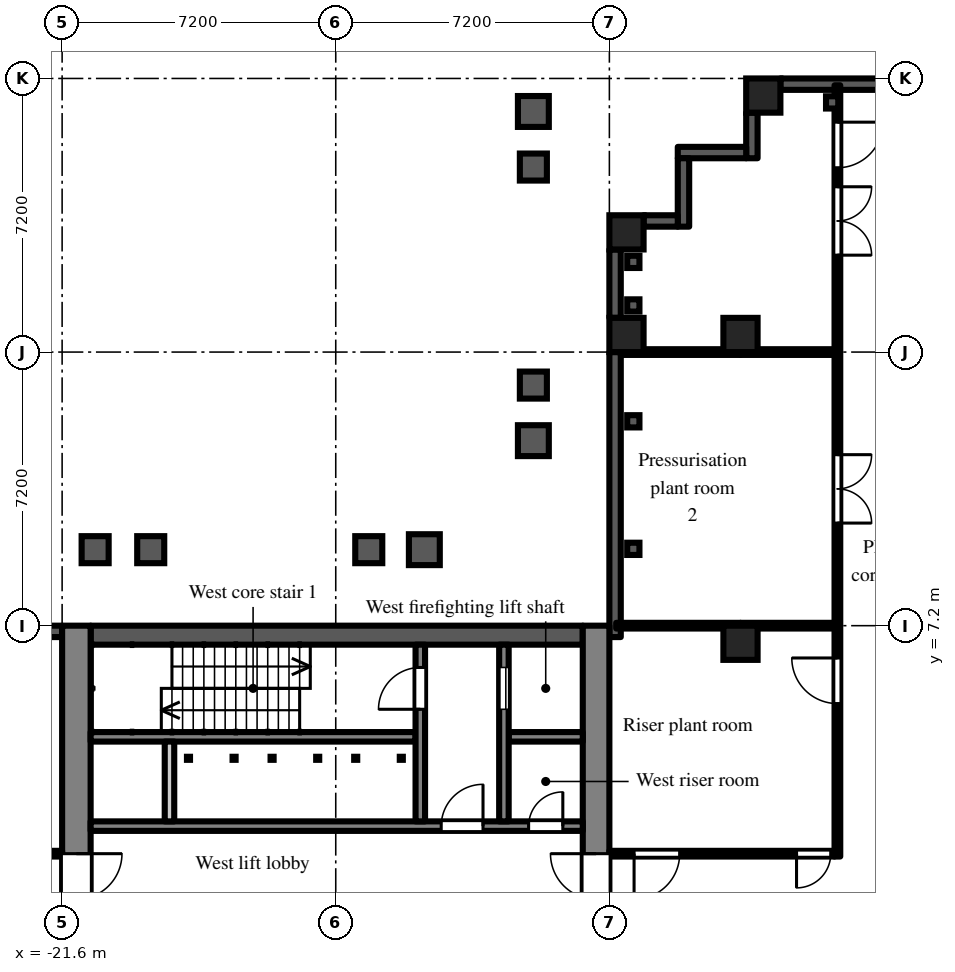
"""IFC4 building model, lengths in metres.
Left out: names, types, materials, properties, quantities, classifications, styles, units other than length and angle.
Written with IfcOpenShell. Run it as: python <this file> out.ifc"""

import sys

from ifc_helpers import new_model, si_unit, direction, frame, frame_2d, origin, origin_2d, place, context, subcontext, project, spatial, rectangle, extrude, element, fill, save


model = new_model("IFC4")
c1 = context("Model", 3, precision=1e-05, world=origin(), true_north=direction((0.0, 1.0)))
c2 = subcontext(c1, "Body", "Model", "MODEL_VIEW")
j1 = project(units=[si_unit("LENGTHUNIT", "METRE"), si_unit("PLANEANGLEUNIT", "RADIAN")], contexts=[c1])
p1 = place(None, origin())
s1 = spatial("IfcSite", under=j1, at=p1, CompositionType="ELEMENT")
p2 = place(p1, origin())
s2 = spatial("IfcBuilding", under=s1, at=p2, CompositionType="ELEMENT")
p3 = place(p2, frame((0.0, 0.0, 111.9)))
s3 = spatial("IfcBuildingStorey", under=s2, at=p3, CompositionType="ELEMENT", Elevation=111.9)
for number, where, z_axis, x_axis in (
    (1, (-6.75, 14.85, 0.0), (0.0, 0.0, 1.0), (1.0, 0.0, 0.0)),
    (2, (-6.75, 17.55, 0.0), (0.0, 0.0, 1.0), (1.0, 0.0, 0.0)),
    (3, (-3.75, 6.75, 0.0), (0.0, 0.0, 1.0), (1.0, 0.0, 0.0)),
    (4, (-3.75, 14.85, 0.0), (0.0, 0.0, 1.0), (1.0, 0.0, 0.0)),
    (5, (-3.15, 21.15, 0.0), (0.0, 0.0, 1.0), (1.0, 0.0, 0.0)),
):
    element("IfcColumn", number, at=place(p3, frame(where, z_axis=z_axis, x_axis=x_axis)), inside=s3, PredefinedType="COLUMN", context=c2, shape_type="SweptSolid", body=[
        extrude(rectangle(XDim=0.9, YDim=0.9, at=origin_2d()), origin(), (0.0, 0.0, 1.0), 4.2),
    ])
p4 = place(p3, frame((2.7, 21.45, 0.0), z_axis=(0.0, 0.0, 1.0), x_axis=(-1.0, 0.0, 0.0)))
e6 = element("IfcWall", 6, at=p4, inside=s3, PredefinedType="SOLIDWALL", context=c2, shape_type="SweptSolid", body=[
    extrude(rectangle(XDim=5.4, YDim=0.3, at=frame_2d((2.7, 0.0))), origin(), (0.0, 0.0, 1.0), 3.4),
])
p5 = place(p3, frame((-3.45, 20.7, 0.0), z_axis=(0.0, 0.0, 1.0), x_axis=(0.0, -1.0, 0.0)))
e7 = element("IfcWall", 7, at=p5, inside=s3, PredefinedType="SOLIDWALL", context=c2, shape_type="SweptSolid", body=[
    extrude(rectangle(XDim=1.2, YDim=0.3, at=frame_2d((0.6, 0.0))), origin(), (0.0, 0.0, 1.0), 3.8),
])
p6 = place(p3, frame((-3.6, 19.65, 0.0), z_axis=(0.0, 0.0, 1.0), x_axis=(-1.0, 0.0, 0.0)))
e8 = element("IfcWall", 8, at=p6, inside=s3, PredefinedType="SOLIDWALL", context=c2, shape_type="SweptSolid", body=[
    extrude(rectangle(XDim=1.8, YDim=0.3, at=frame_2d((0.9, 0.0))), origin(), (0.0, 0.0, 1.0), 3.8),
])
p7 = place(p3, frame((-5.25, 19.5, 0.0), z_axis=(0.0, 0.0, 1.0), x_axis=(0.0, -1.0, 0.0)))
e9 = element("IfcWall", 9, at=p7, inside=s3, PredefinedType="SOLIDWALL", context=c2, shape_type="SweptSolid", body=[
    extrude(rectangle(XDim=1.8, YDim=0.3, at=frame_2d((0.9, 0.0))), origin(), (0.0, 0.0, 1.0), 3.8),
])
p8 = place(p3, frame((-5.4, 17.85, 0.0), z_axis=(0.0, 0.0, 1.0), x_axis=(-1.0, 0.0, 0.0)))
e10 = element("IfcWall", 10, at=p8, inside=s3, PredefinedType="SOLIDWALL", context=c2, shape_type="SweptSolid", body=[
    extrude(rectangle(XDim=0.9, YDim=0.3, at=frame_2d((0.45, 0.0))), origin(), (0.0, 0.0, 1.0), 3.8),
])
p9 = place(p3, frame((-7.05, 17.1, 0.0), z_axis=(0.0, 0.0, 1.0), x_axis=(0.0, -1.0, 0.0)))
e11 = element("IfcWall", 11, at=p9, inside=s3, PredefinedType="SOLIDWALL", context=c2, shape_type="SweptSolid", body=[
    extrude(rectangle(XDim=1.8, YDim=0.3, at=frame_2d((0.9, 0.0))), origin(), (0.0, 0.0, 1.0), 3.4),
])
p10 = place(p3, frame((-7.05, 14.4, 0.0), z_axis=(0.0, 0.0, 1.0), x_axis=(0.0, -1.0, 0.0)))
e12 = element("IfcWall", 12, at=p10, inside=s3, PredefinedType="SOLIDWALL", context=c2, shape_type="SweptSolid", body=[
    extrude(rectangle(XDim=7.5, YDim=0.3, at=frame_2d((3.75, 0.0))), origin(), (0.0, 0.0, 1.0), 3.8),
])
p11 = place(p3, frame((-21.6, 7.05, 0.0), z_axis=(0.0, 0.0, 1.0), x_axis=(-1.0, 0.0, 0.0)))
e13 = element("IfcWall", 13, at=p11, inside=s3, PredefinedType="SOLIDWALL", context=c2, shape_type="SweptSolid", body=[
    extrude(rectangle(XDim=2.7, YDim=0.3, at=frame_2d((1.35, 0.0))), origin(), (0.0, 0.0, 1.0), 3.4),
])
p12 = place(p3, frame((-7.55, -7.2, 0.0), z_axis=(0.0, 0.0, 1.0), x_axis=(0.0, 1.0, 0.0)))
e14 = element("IfcWall", 14, at=p12, inside=s3, PredefinedType="SHEAR", context=c2, shape_type="SweptSolid", body=[
    extrude(rectangle(XDim=14.4, YDim=0.7, at=frame_2d((7.2, 0.0))), origin(), (0.0, 0.0, 1.0), 3.8),
])
p13 = place(p12, frame((6.0, 0.0, 0.0)))
e15 = element("IfcOpeningElement", 15, at=p13, cuts=e14, PredefinedType="OPENING", context=c2, shape_type="SweptSolid", body=[
    extrude(rectangle(XDim=2.4, YDim=2.2, at=frame_2d((1.2, 1.1))), frame((0.0, 0.36, 0.0), z_axis=(0.0, -1.0, 0.0), x_axis=(1.0, 0.0, 0.0)), (0.0, 0.0, 1.0), 0.72),
])
p14 = place(p3, frame((-21.225, -7.2, 0.0), z_axis=(0.0, 0.0, 1.0), x_axis=(0.0, 1.0, 0.0)))
e16 = element("IfcWall", 16, at=p14, inside=s3, PredefinedType="SHEAR", context=c2, shape_type="SweptSolid", body=[
    extrude(rectangle(XDim=14.4, YDim=0.75, at=frame_2d((7.2, 0.0))), origin(), (0.0, 0.0, 1.0), 3.8),
])
p15 = place(p14, frame((6.0, 0.0, 0.0)))
e17 = element("IfcOpeningElement", 17, at=p15, cuts=e16, PredefinedType="OPENING", context=c2, shape_type="SweptSolid", body=[
    extrude(rectangle(XDim=2.4, YDim=2.2, at=frame_2d((1.2, 1.1))), frame((0.0, 0.385, 0.0), z_axis=(0.0, -1.0, 0.0), x_axis=(1.0, 0.0, 0.0)), (0.0, 0.0, 1.0), 0.77),
])
p16 = place(p3, frame((-7.9, 6.95, 0.0), z_axis=(0.0, 0.0, 1.0), x_axis=(-1.0, 0.0, 0.0)))
e18 = element("IfcWall", 18, at=p16, inside=s3, PredefinedType="SHEAR", context=c2, shape_type="SweptSolid", body=[
    extrude(rectangle(XDim=12.95, YDim=0.5, at=frame_2d((6.475, 0.0))), origin(), (0.0, 0.0, 1.0), 3.8),
])
p17 = place(p3, frame((-7.9, 1.925, 0.0), z_axis=(0.0, 0.0, 1.0), x_axis=(-1.0, 0.0, 0.0)))
e19 = element("IfcWall", 19, at=p17, inside=s3, PredefinedType="SHEAR", context=c2, shape_type="SweptSolid", body=[
    extrude(rectangle(XDim=12.95, YDim=0.25, at=frame_2d((6.475, 0.0))), origin(), (0.0, 0.0, 1.0), 3.8),
])
p18 = place(p17, frame((0.525, 0.0, 0.0)))
e20 = element("IfcOpeningElement", 20, at=p18, cuts=e19, PredefinedType="OPENING", context=c2, shape_type="SweptSolid", body=[
    extrude(rectangle(XDim=0.9, YDim=2.1, at=frame_2d((0.45, 1.05))), frame((0.0, 0.135, 0.0), z_axis=(0.0, -1.0, 0.0), x_axis=(1.0, 0.0, 0.0)), (0.0, 0.0, 1.0), 0.27),
])
p19 = place(p17, frame((2.625, 0.0, 0.0)))
e21 = element("IfcOpeningElement", 21, at=p19, cuts=e19, PredefinedType="OPENING", context=c2, shape_type="SweptSolid", body=[
    extrude(rectangle(XDim=1.1, YDim=2.1, at=frame_2d((0.55, 1.05))), frame((0.0, 0.135, 0.0), z_axis=(0.0, -1.0, 0.0), x_axis=(1.0, 0.0, 0.0)), (0.0, 0.0, 1.0), 0.27),
])
p20 = place(p3, frame((-7.9, 4.275, 0.0), z_axis=(0.0, 0.0, 1.0), x_axis=(-1.0, 0.0, 0.0)))
e22 = element("IfcWall", 22, at=p20, inside=s3, PredefinedType="SHEAR", context=c2, shape_type="SweptSolid", body=[
    extrude(rectangle(XDim=1.95, YDim=0.25, at=frame_2d((0.975, 0.0))), origin(), (0.0, 0.0, 1.0), 3.8),
])
p21 = place(p3, frame((-12.3, 4.275, 0.0), z_axis=(0.0, 0.0, 1.0), x_axis=(-1.0, 0.0, 0.0)))
e23 = element("IfcWall", 23, at=p21, inside=s3, PredefinedType="SHEAR", context=c2, shape_type="SweptSolid", body=[
    extrude(rectangle(XDim=8.55, YDim=0.25, at=frame_2d((4.275, 0.0))), origin(), (0.0, 0.0, 1.0), 3.8),
])
p22 = place(p3, frame((-9.975, 2.05, 0.0), z_axis=(0.0, 0.0, 1.0), x_axis=(0.0, 1.0, 0.0)))
e24 = element("IfcWall", 24, at=p22, inside=s3, PredefinedType="SHEAR", context=c2, shape_type="SweptSolid", body=[
    extrude(rectangle(XDim=4.65, YDim=0.25, at=frame_2d((2.325, 0.0))), origin(), (0.0, 0.0, 1.0), 3.8),
])
p23 = place(p22, frame((2.95, 0.0, 0.0)))
e25 = element("IfcOpeningElement", 25, at=p23, cuts=e24, PredefinedType="OPENING", context=c2, shape_type="SweptSolid", body=[
    extrude(rectangle(XDim=1.1, YDim=2.1, at=frame_2d((0.55, 1.05))), frame((0.0, 0.135, 0.0), z_axis=(0.0, -1.0, 0.0), x_axis=(1.0, 0.0, 0.0)), (0.0, 0.0, 1.0), 0.27),
])
p24 = place(p3, frame((-12.175, 2.05, 0.0), z_axis=(0.0, 0.0, 1.0), x_axis=(0.0, 1.0, 0.0)))
e26 = element("IfcWall", 26, at=p24, inside=s3, PredefinedType="SHEAR", context=c2, shape_type="SweptSolid", body=[
    extrude(rectangle(XDim=4.65, YDim=0.25, at=frame_2d((2.325, 0.0))), origin(), (0.0, 0.0, 1.0), 3.8),
])
p25 = place(p24, frame((2.95, 0.0, 0.0)))
e27 = element("IfcOpeningElement", 27, at=p25, cuts=e26, PredefinedType="OPENING", context=c2, shape_type="SweptSolid", body=[
    extrude(rectangle(XDim=1.1, YDim=2.1, at=frame_2d((0.55, 1.05))), frame((0.0, 0.135, 0.0), z_axis=(0.0, -1.0, 0.0), x_axis=(1.0, 0.0, 0.0)), (0.0, 0.0, 1.0), 0.27),
])
p26 = place(p3, frame((-18.775, 2.05, 0.0), z_axis=(0.0, 0.0, 1.0), x_axis=(0.0, 1.0, 0.0)))
e28 = element("IfcWall", 28, at=p26, inside=s3, PredefinedType="PARTITIONING", context=c2, shape_type="SweptSolid", body=[
    extrude(rectangle(XDim=2.1, YDim=0.25, at=frame_2d((1.05, 0.0))), origin(), (0.0, 0.0, 1.0), 3.8),
])
p27 = place(p3, frame((-36.5, 1.2, 0.0), z_axis=(0.0, 0.0, 1.0), x_axis=(1.0, 0.0, 0.0)))
e29 = element("IfcWall", 29, at=p27, inside=s3, PredefinedType="PARTITIONING", context=c2, shape_type="SweptSolid", body=[
    extrude(rectangle(XDim=14.9, YDim=0.15, at=frame_2d((7.45, 0.0))), origin(), (0.0, 0.0, 1.0), 3.8),
])
p28 = place(p27, frame((4.75, 0.0, 0.0)))
e30 = element("IfcOpeningElement", 30, at=p28, cuts=e29, PredefinedType="OPENING", context=c2, shape_type="SweptSolid", body=[
    extrude(rectangle(XDim=0.9, YDim=2.1, at=frame_2d((0.45, 1.05))), frame((0.0, 0.085, 0.0), z_axis=(0.0, -1.0, 0.0), x_axis=(1.0, 0.0, 0.0)), (0.0, 0.0, 1.0), 0.17),
])
p29 = place(p27, frame((12.5, 0.0, 0.0)))
e31 = element("IfcOpeningElement", 31, at=p29, cuts=e29, PredefinedType="OPENING", context=c2, shape_type="SweptSolid", body=[
    extrude(rectangle(XDim=1.2, YDim=2.1, at=frame_2d((0.6, 1.05))), frame((0.0, 0.085, 0.0), z_axis=(0.0, -1.0, 0.0), x_axis=(1.0, 0.0, 0.0)), (0.0, 0.0, 1.0), 0.17),
])
p30 = place(p27, frame((1.15, 0.0, 0.0)))
e32 = element("IfcOpeningElement", 32, at=p30, cuts=e29, PredefinedType="OPENING", context=c2, shape_type="SweptSolid", body=[
    extrude(rectangle(XDim=1.8, YDim=2.1, at=frame_2d((0.9, 1.05))), frame((0.0, 0.085, 0.0), z_axis=(0.0, -1.0, 0.0), x_axis=(1.0, 0.0, 0.0)), (0.0, 0.0, 1.0), 0.17),
])
p31 = place(p3, frame((-7.2, 1.2, 0.0), z_axis=(0.0, 0.0, 1.0), x_axis=(1.0, 0.0, 0.0)))
e33 = element("IfcWall", 33, at=p31, inside=s3, PredefinedType="PARTITIONING", context=c2, shape_type="SweptSolid", body=[
    extrude(rectangle(XDim=5.925, YDim=0.15, at=frame_2d((2.962, 0.0))), origin(), (0.0, 0.0, 1.0), 3.8),
])
p32 = place(p31, frame((0.65, 0.0, 0.0)))
e34 = element("IfcOpeningElement", 34, at=p32, cuts=e33, PredefinedType="OPENING", context=c2, shape_type="SweptSolid", body=[
    extrude(rectangle(XDim=1.2, YDim=2.1, at=frame_2d((0.6, 1.05))), frame((0.0, 0.085, 0.0), z_axis=(0.0, -1.0, 0.0), x_axis=(1.0, 0.0, 0.0)), (0.0, 0.0, 1.0), 0.17),
])
p33 = place(p31, frame((4.925, 0.0, 0.0)))
e35 = element("IfcOpeningElement", 35, at=p33, cuts=e33, PredefinedType="OPENING", context=c2, shape_type="SweptSolid", body=[
    extrude(rectangle(XDim=0.9, YDim=2.1, at=frame_2d((0.45, 1.05))), frame((0.0, 0.085, 0.0), z_axis=(0.0, -1.0, 0.0), x_axis=(1.0, 0.0, 0.0)), (0.0, 0.0, 1.0), 0.17),
])
p34 = place(p3, frame((-7.02, 7.2, 0.0), z_axis=(0.0, 0.0, 1.0), x_axis=(1.0, 0.0, 0.0)))
e36 = element("IfcWall", 36, at=p34, inside=s3, PredefinedType="PARTITIONING", context=c2, shape_type="SweptSolid", body=[
    extrude(rectangle(XDim=3.27, YDim=0.15, at=frame_2d((1.635, 0.0))), origin(), (0.0, 0.0, 1.0), 3.4),
])
p35 = place(p3, frame((-6.9, 14.4, 0.0), z_axis=(0.0, 0.0, 1.0), x_axis=(1.0, 0.0, 0.0)))
e37 = element("IfcWall", 37, at=p35, inside=s3, PredefinedType="PARTITIONING", context=c2, shape_type="SweptSolid", body=[
    extrude(rectangle(XDim=3.15, YDim=0.15, at=frame_2d((1.575, 0.0))), origin(), (0.0, 0.0, 1.0), 3.4),
])
p36 = place(p3, frame((-1.2, 1.125, 0.0), z_axis=(0.0, 0.0, 1.0), x_axis=(0.0, 1.0, 0.0)))
e38 = element("IfcWall", 38, at=p36, inside=s3, PredefinedType="PARTITIONING", context=c2, shape_type="SweptSolid", body=[
    extrude(rectangle(XDim=20.295, YDim=0.15, at=frame_2d((10.147, 0.0))), origin(), (0.0, 0.0, 1.0), 3.8),
])
p37 = place(p36, frame((4.025, 0.0, 0.0)))
e39 = element("IfcOpeningElement", 39, at=p37, cuts=e38, PredefinedType="OPENING", context=c2, shape_type="SweptSolid", body=[
    extrude(rectangle(XDim=1.2, YDim=2.1, at=frame_2d((0.6, 1.05))), frame((0.0, 0.085, 0.0), z_axis=(0.0, -1.0, 0.0), x_axis=(1.0, 0.0, 0.0)), (0.0, 0.0, 1.0), 0.17),
])
p38 = place(p36, frame((8.775, 0.0, 0.0)))
e40 = element("IfcOpeningElement", 40, at=p38, cuts=e38, PredefinedType="OPENING", context=c2, shape_type="SweptSolid", body=[
    extrude(rectangle(XDim=1.8, YDim=2.1, at=frame_2d((0.9, 1.05))), frame((0.0, 0.085, 0.0), z_axis=(0.0, -1.0, 0.0), x_axis=(1.0, 0.0, 0.0)), (0.0, 0.0, 1.0), 0.17),
])
p39 = place(p36, frame((15.825, 0.0, 0.0)))
e41 = element("IfcOpeningElement", 41, at=p39, cuts=e38, PredefinedType="OPENING", context=c2, shape_type="SweptSolid", body=[
    extrude(rectangle(XDim=1.8, YDim=2.1, at=frame_2d((0.9, 1.05))), frame((0.0, 0.085, 0.0), z_axis=(0.0, -1.0, 0.0), x_axis=(1.0, 0.0, 0.0)), (0.0, 0.0, 1.0), 0.17),
])
p40 = place(p36, frame((18.125, 0.0, 0.0)))
e42 = element("IfcOpeningElement", 42, at=p40, cuts=e38, PredefinedType="OPENING", context=c2, shape_type="SweptSolid", body=[
    extrude(rectangle(XDim=1.2, YDim=2.1, at=frame_2d((0.6, 1.05))), frame((0.0, 0.085, 0.0), z_axis=(0.0, -1.0, 0.0), x_axis=(1.0, 0.0, 0.0)), (0.0, 0.0, 1.0), 0.17),
])
for number, where, z_axis, x_axis in (
    (43, (-3.75, 7.2, 0.0), (0.0, 0.0, 1.0), (1.0, 0.0, 0.0)),
    (44, (-3.75, 14.4, 0.0), (0.0, 0.0, 1.0), (1.0, 0.0, 0.0)),
):
    element("IfcWall", number, at=place(p3, frame(where, z_axis=z_axis, x_axis=x_axis)), inside=s3, PredefinedType="PARTITIONING", context=c2, shape_type="SweptSolid", body=[
        extrude(rectangle(XDim=2.475, YDim=0.15, at=frame_2d((1.238, 0.0))), origin(), (0.0, 0.0, 1.0), 3.8),
    ])
p41 = place(p23, origin())
e45 = element("IfcDoor", 45, at=p41, inside=s3, OperationType="SLIDING_TO_LEFT", PredefinedType="DOOR", context=c2, shape_type="SweptSolid", body=[
    extrude(rectangle(XDim=1.1, YDim=2.1, at=frame_2d((0.55, 1.05))), frame((0.0, 0.025, 0.0), z_axis=(0.0, -1.0, 0.0), x_axis=(1.0, 0.0, 0.0)), (0.0, 0.0, 1.0), 0.05),
])
fill(e25, e45)
p42 = place(p25, origin())
e46 = element("IfcDoor", 46, at=p42, inside=s3, OperationType="SINGLE_SWING_LEFT", PredefinedType="DOOR", context=c2, shape_type="SweptSolid", body=[
    extrude(rectangle(XDim=1.1, YDim=2.1, at=frame_2d((0.55, 1.05))), frame((0.0, 0.025, 0.0), z_axis=(0.0, -1.0, 0.0), x_axis=(1.0, 0.0, 0.0)), (0.0, 0.0, 1.0), 0.05),
])
fill(e27, e46)
p43 = place(p18, frame((0.9, 0.0, 0.0), z_axis=(0.0, 0.0, 1.0), x_axis=(-1.0, 0.0, 0.0)))
e47 = element("IfcDoor", 47, at=p43, inside=s3, OperationType="SINGLE_SWING_RIGHT", PredefinedType="DOOR", context=c2, shape_type="SweptSolid", body=[
    extrude(rectangle(XDim=0.9, YDim=2.1, at=frame_2d((0.45, 1.05))), frame((0.0, 0.025, 0.0), z_axis=(0.0, -1.0, 0.0), x_axis=(1.0, 0.0, 0.0)), (0.0, 0.0, 1.0), 0.05),
])
fill(e20, e47)
p44 = place(p19, frame((1.1, 0.0, 0.0), z_axis=(0.0, 0.0, 1.0), x_axis=(-1.0, 0.0, 0.0)))
e48 = element("IfcDoor", 48, at=p44, inside=s3, OperationType="SINGLE_SWING_RIGHT", PredefinedType="DOOR", context=c2, shape_type="SweptSolid", body=[
    extrude(rectangle(XDim=1.1, YDim=2.1, at=frame_2d((0.55, 1.05))), frame((0.0, 0.025, 0.0), z_axis=(0.0, -1.0, 0.0), x_axis=(1.0, 0.0, 0.0)), (0.0, 0.0, 1.0), 0.05),
])
fill(e21, e48)
p45 = place(p13, origin())
e49 = element("IfcDoor", 49, at=p45, inside=s3, OperationType="DOUBLE_DOOR_DOUBLE_SWING", PredefinedType="DOOR", context=c2, shape_type="SweptSolid", body=[
    extrude(rectangle(XDim=2.4, YDim=2.2, at=frame_2d((1.2, 1.1))), frame((0.0, 0.025, 0.0), z_axis=(0.0, -1.0, 0.0), x_axis=(1.0, 0.0, 0.0)), (0.0, 0.0, 1.0), 0.05),
])
fill(e15, e49)
p46 = place(p15, frame((2.4, 0.0, 0.0), z_axis=(0.0, 0.0, 1.0), x_axis=(-1.0, 0.0, 0.0)))
e50 = element("IfcDoor", 50, at=p46, inside=s3, OperationType="DOUBLE_DOOR_DOUBLE_SWING", PredefinedType="DOOR", context=c2, shape_type="SweptSolid", body=[
    extrude(rectangle(XDim=2.4, YDim=2.2, at=frame_2d((1.2, 1.1))), frame((0.0, 0.025, 0.0), z_axis=(0.0, -1.0, 0.0), x_axis=(1.0, 0.0, 0.0)), (0.0, 0.0, 1.0), 0.05),
])
fill(e17, e50)
p47 = place(p32, frame((1.2, 0.0, 0.0), z_axis=(0.0, 0.0, 1.0), x_axis=(-1.0, 0.0, 0.0)))
e51 = element("IfcDoor", 51, at=p47, inside=s3, OperationType="SINGLE_SWING_RIGHT", PredefinedType="DOOR", context=c2, shape_type="SweptSolid", body=[
    extrude(rectangle(XDim=1.2, YDim=2.1, at=frame_2d((0.6, 1.05))), frame((0.0, 0.025, 0.0), z_axis=(0.0, -1.0, 0.0), x_axis=(1.0, 0.0, 0.0)), (0.0, 0.0, 1.0), 0.05),
])
fill(e34, e51)
p48 = place(p33, frame((0.9, 0.0, 0.0), z_axis=(0.0, 0.0, 1.0), x_axis=(-1.0, 0.0, 0.0)))
e52 = element("IfcDoor", 52, at=p48, inside=s3, OperationType="SINGLE_SWING_RIGHT", PredefinedType="DOOR", context=c2, shape_type="SweptSolid", body=[
    extrude(rectangle(XDim=0.9, YDim=2.1, at=frame_2d((0.45, 1.05))), frame((0.0, 0.025, 0.0), z_axis=(0.0, -1.0, 0.0), x_axis=(1.0, 0.0, 0.0)), (0.0, 0.0, 1.0), 0.05),
])
fill(e35, e52)
p49 = place(p37, origin())
e53 = element("IfcDoor", 53, at=p49, inside=s3, OperationType="SINGLE_SWING_RIGHT", PredefinedType="DOOR", context=c2, shape_type="SweptSolid", body=[
    extrude(rectangle(XDim=1.2, YDim=2.1, at=frame_2d((0.6, 1.05))), frame((0.0, 0.025, 0.0), z_axis=(0.0, -1.0, 0.0), x_axis=(1.0, 0.0, 0.0)), (0.0, 0.0, 1.0), 0.05),
])
fill(e39, e53)
p50 = place(p38, frame((1.8, 0.0, 0.0), z_axis=(0.0, 0.0, 1.0), x_axis=(-1.0, 0.0, 0.0)))
e54 = element("IfcDoor", 54, at=p50, inside=s3, OperationType="DOUBLE_DOOR_DOUBLE_SWING", PredefinedType="DOOR", context=c2, shape_type="SweptSolid", body=[
    extrude(rectangle(XDim=1.8, YDim=2.1, at=frame_2d((0.9, 1.05))), frame((0.0, 0.025, 0.0), z_axis=(0.0, -1.0, 0.0), x_axis=(1.0, 0.0, 0.0)), (0.0, 0.0, 1.0), 0.05),
])
fill(e40, e54)
p51 = place(p39, frame((1.8, 0.0, 0.0), z_axis=(0.0, 0.0, 1.0), x_axis=(-1.0, 0.0, 0.0)))
e55 = element("IfcDoor", 55, at=p51, inside=s3, OperationType="DOUBLE_DOOR_DOUBLE_SWING", PredefinedType="DOOR", context=c2, shape_type="SweptSolid", body=[
    extrude(rectangle(XDim=1.8, YDim=2.1, at=frame_2d((0.9, 1.05))), frame((0.0, 0.025, 0.0), z_axis=(0.0, -1.0, 0.0), x_axis=(1.0, 0.0, 0.0)), (0.0, 0.0, 1.0), 0.05),
])
fill(e41, e55)
p52 = place(p40, frame((1.2, 0.0, 0.0), z_axis=(0.0, 0.0, 1.0), x_axis=(-1.0, 0.0, 0.0)))
e56 = element("IfcDoor", 56, at=p52, inside=s3, OperationType="SINGLE_SWING_LEFT", PredefinedType="DOOR", context=c2, shape_type="SweptSolid", body=[
    extrude(rectangle(XDim=1.2, YDim=2.1, at=frame_2d((0.6, 1.05))), frame((0.0, 0.025, 0.0), z_axis=(0.0, -1.0, 0.0), x_axis=(1.0, 0.0, 0.0)), (0.0, 0.0, 1.0), 0.05),
])
fill(e42, e56)
save(model, sys.argv[1])
